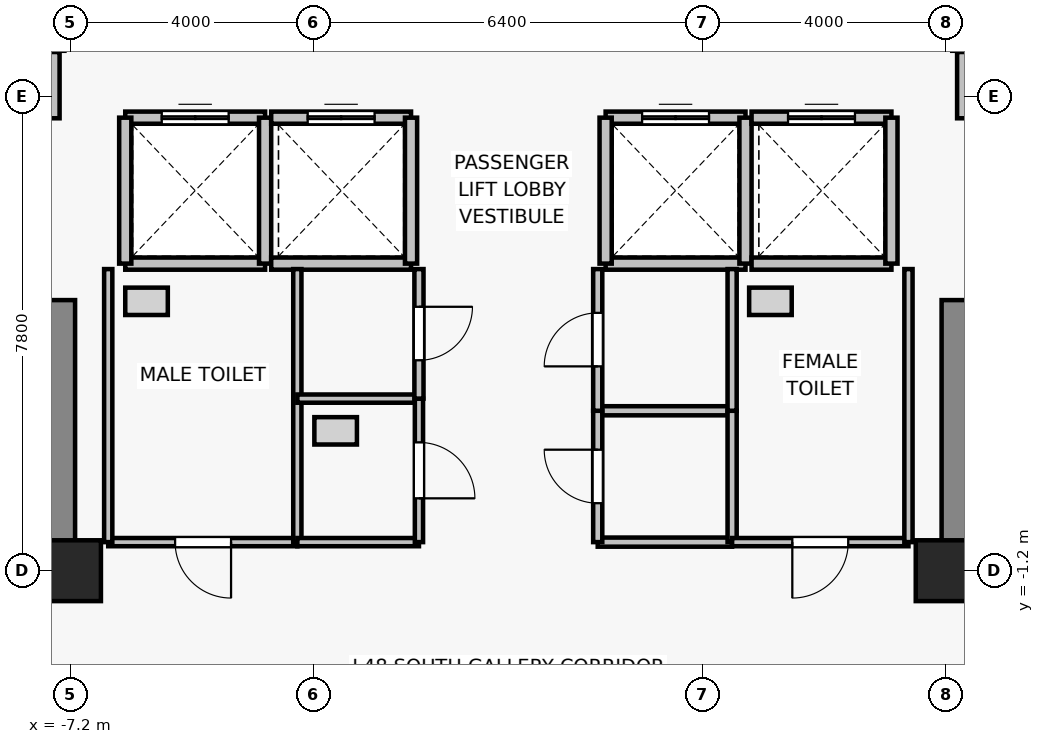
"""IFC4 building model, lengths in metres.
Left out: names, types, materials, properties, quantities, classifications, styles, units other than length and angle.
Written with IfcOpenShell. Run it as: python <this file> out.ifc"""

import sys

from ifc_helpers import new_model, si_unit, direction, frame, frame_2d, origin, origin_2d, place, context, subcontext, project, spatial, rectangle, extrude, source, transform, mapped, element, fill, save


model = new_model("IFC4")
c1 = context("Model", 3, precision=1e-05, world=origin(), true_north=direction((0.0, 1.0)))
c2 = subcontext(c1, "Body", "Model", "MODEL_VIEW")
j1 = project(units=[si_unit("LENGTHUNIT", "METRE"), si_unit("PLANEANGLEUNIT", "RADIAN")], contexts=[c1])
p1 = place(None, origin())
s1 = spatial("IfcSite", under=j1, at=p1, CompositionType="ELEMENT")
p2 = place(p1, origin())
s2 = spatial("IfcBuilding", under=s1, at=p2, CompositionType="ELEMENT")
p3 = place(p2, frame((0.0, 0.0, 172.6)))
s3 = spatial("IfcBuildingStorey", under=s2, at=p3, CompositionType="ELEMENT", Elevation=172.6)
for number, where, z_axis, x_axis in (
    (1, (-7.2, -1.2, 0.0), (0.0, 0.0, 1.0), (1.0, 0.0, 0.0)),
    (2, (7.2, -1.2, 0.0), (0.0, 0.0, 1.0), (1.0, 0.0, 0.0)),
):
    element("IfcColumn", number, at=place(p3, frame(where, z_axis=z_axis, x_axis=x_axis)), inside=s3, PredefinedType="COLUMN", context=c2, shape_type="SweptSolid", body=[
        extrude(rectangle(XDim=1.0, YDim=1.0, at=origin_2d()), origin(), (0.0, 0.0, 1.0), 3.3),
    ])
for number, where, z_axis, x_axis in (
    (3, (-7.4, -0.825, 0.0), (0.0, 0.0, 1.0), (0.0, 1.0, 0.0)),
    (4, (7.4, -0.825, 0.0), (0.0, 0.0, 1.0), (0.0, 1.0, 0.0)),
):
    element("IfcWall", number, at=place(p3, frame(where, z_axis=z_axis, x_axis=x_axis)), inside=s3, PredefinedType="SHEAR", context=c2, shape_type="SweptSolid", body=[
        extrude(rectangle(XDim=4.075, YDim=0.55, at=frame_2d((2.038, 0.0))), origin(), (0.0, 0.0, 1.0), 3.075),
    ])
p4 = place(p3, frame((-4.0, 3.85, 0.0), z_axis=(0.0, 0.0, 1.0), x_axis=(-1.0, 0.0, 0.0)))
e5 = element("IfcWall", 5, at=p4, inside=s3, PredefinedType="SOLIDWALL", context=c2, shape_type="SweptSolid", body=[
    extrude(rectangle(XDim=2.3, YDim=0.2, at=frame_2d((1.15, 0.0))), origin(), (0.0, 0.0, 1.0), 3.075),
])
p5 = place(p3, frame((-6.3, 6.25, 0.0), z_axis=(0.0, 0.0, 1.0), x_axis=(1.0, 0.0, 0.0)))
e6 = element("IfcWall", 6, at=p5, inside=s3, PredefinedType="SOLIDWALL", context=c2, shape_type="SweptSolid", body=[
    extrude(rectangle(XDim=2.3, YDim=0.2, at=frame_2d((1.15, 0.0))), origin(), (0.0, 0.0, 1.0), 3.075),
])
p6 = place(p5, frame((0.6, 0.0, 0.0)))
e7 = element("IfcOpeningElement", 7, at=p6, cuts=e6, PredefinedType="OPENING", context=c2, shape_type="SweptSolid", body=[
    extrude(rectangle(XDim=1.1, YDim=2.2, at=frame_2d((0.55, 1.1))), frame((0.0, 0.11, 0.0), z_axis=(0.0, -1.0, 0.0), x_axis=(1.0, 0.0, 0.0)), (0.0, 0.0, 1.0), 0.22),
])
for number, where, z_axis, x_axis in (
    (8, (-6.3, 3.85, 0.0), (0.0, 0.0, 1.0), (0.0, 1.0, 0.0)),
    (9, (-4.0, 6.25, 0.0), (0.0, 0.0, 1.0), (0.0, -1.0, 0.0)),
):
    element("IfcWall", number, at=place(p3, frame(where, z_axis=z_axis, x_axis=x_axis)), inside=s3, PredefinedType="SOLIDWALL", context=c2, shape_type="SweptSolid", body=[
        extrude(rectangle(XDim=2.4, YDim=0.2, at=frame_2d((1.2, 0.0))), origin(), (0.0, 0.0, 1.0), 3.075),
    ])
p7 = place(p3, frame((-1.6, 3.85, 0.0), z_axis=(0.0, 0.0, 1.0), x_axis=(-1.0, 0.0, 0.0)))
e10 = element("IfcWall", 10, at=p7, inside=s3, PredefinedType="SOLIDWALL", context=c2, shape_type="SweptSolid", body=[
    extrude(rectangle(XDim=2.3, YDim=0.2, at=frame_2d((1.15, 0.0))), origin(), (0.0, 0.0, 1.0), 3.075),
])
p8 = place(p3, frame((-3.9, 6.25, 0.0), z_axis=(0.0, 0.0, 1.0), x_axis=(1.0, 0.0, 0.0)))
e11 = element("IfcWall", 11, at=p8, inside=s3, PredefinedType="SOLIDWALL", context=c2, shape_type="SweptSolid", body=[
    extrude(rectangle(XDim=2.3, YDim=0.2, at=frame_2d((1.15, 0.0))), origin(), (0.0, 0.0, 1.0), 3.075),
])
p9 = place(p8, frame((0.6, 0.0, 0.0)))
e12 = element("IfcOpeningElement", 12, at=p9, cuts=e11, PredefinedType="OPENING", context=c2, shape_type="SweptSolid", body=[
    extrude(rectangle(XDim=1.1, YDim=2.2, at=frame_2d((0.55, 1.1))), frame((0.0, 0.11, 0.0), z_axis=(0.0, -1.0, 0.0), x_axis=(1.0, 0.0, 0.0)), (0.0, 0.0, 1.0), 0.22),
])
p10 = place(p3, frame((-1.6, 6.25, 0.0), z_axis=(0.0, 0.0, 1.0), x_axis=(0.0, -1.0, 0.0)))
e13 = element("IfcWall", 13, at=p10, inside=s3, PredefinedType="SOLIDWALL", context=c2, shape_type="SweptSolid", body=[
    extrude(rectangle(XDim=2.4, YDim=0.2, at=frame_2d((1.2, 0.0))), origin(), (0.0, 0.0, 1.0), 3.075),
])
p11 = place(p3, frame((3.9, 3.85, 0.0), z_axis=(0.0, 0.0, 1.0), x_axis=(-1.0, 0.0, 0.0)))
e14 = element("IfcWall", 14, at=p11, inside=s3, PredefinedType="SOLIDWALL", context=c2, shape_type="SweptSolid", body=[
    extrude(rectangle(XDim=2.3, YDim=0.2, at=frame_2d((1.15, 0.0))), origin(), (0.0, 0.0, 1.0), 3.075),
])
p12 = place(p3, frame((1.6, 6.25, 0.0), z_axis=(0.0, 0.0, 1.0), x_axis=(1.0, 0.0, 0.0)))
e15 = element("IfcWall", 15, at=p12, inside=s3, PredefinedType="SOLIDWALL", context=c2, shape_type="SweptSolid", body=[
    extrude(rectangle(XDim=2.3, YDim=0.2, at=frame_2d((1.15, 0.0))), origin(), (0.0, 0.0, 1.0), 3.075),
])
p13 = place(p12, frame((0.6, 0.0, 0.0)))
e16 = element("IfcOpeningElement", 16, at=p13, cuts=e15, PredefinedType="OPENING", context=c2, shape_type="SweptSolid", body=[
    extrude(rectangle(XDim=1.1, YDim=2.2, at=frame_2d((0.55, 1.1))), frame((0.0, 0.11, 0.0), z_axis=(0.0, -1.0, 0.0), x_axis=(1.0, 0.0, 0.0)), (0.0, 0.0, 1.0), 0.22),
])
for number, where, z_axis, x_axis in (
    (17, (1.6, 3.85, 0.0), (0.0, 0.0, 1.0), (0.0, 1.0, 0.0)),
    (18, (3.9, 6.25, 0.0), (0.0, 0.0, 1.0), (0.0, -1.0, 0.0)),
):
    element("IfcWall", number, at=place(p3, frame(where, z_axis=z_axis, x_axis=x_axis)), inside=s3, PredefinedType="SOLIDWALL", context=c2, shape_type="SweptSolid", body=[
        extrude(rectangle(XDim=2.4, YDim=0.2, at=frame_2d((1.2, 0.0))), origin(), (0.0, 0.0, 1.0), 3.075),
    ])
p14 = place(p3, frame((6.3, 3.85, 0.0), z_axis=(0.0, 0.0, 1.0), x_axis=(-1.0, 0.0, 0.0)))
e19 = element("IfcWall", 19, at=p14, inside=s3, PredefinedType="SOLIDWALL", context=c2, shape_type="SweptSolid", body=[
    extrude(rectangle(XDim=2.3, YDim=0.2, at=frame_2d((1.15, 0.0))), origin(), (0.0, 0.0, 1.0), 3.075),
])
p15 = place(p3, frame((4.0, 6.25, 0.0), z_axis=(0.0, 0.0, 1.0), x_axis=(1.0, 0.0, 0.0)))
e20 = element("IfcWall", 20, at=p15, inside=s3, PredefinedType="SOLIDWALL", context=c2, shape_type="SweptSolid", body=[
    extrude(rectangle(XDim=2.3, YDim=0.2, at=frame_2d((1.15, 0.0))), origin(), (0.0, 0.0, 1.0), 3.075),
])
p16 = place(p15, frame((0.6, 0.0, 0.0)))
e21 = element("IfcOpeningElement", 21, at=p16, cuts=e20, PredefinedType="OPENING", context=c2, shape_type="SweptSolid", body=[
    extrude(rectangle(XDim=1.1, YDim=2.2, at=frame_2d((0.55, 1.1))), frame((0.0, 0.11, 0.0), z_axis=(0.0, -1.0, 0.0), x_axis=(1.0, 0.0, 0.0)), (0.0, 0.0, 1.0), 0.22),
])
p17 = place(p3, frame((6.3, 6.25, 0.0), z_axis=(0.0, 0.0, 1.0), x_axis=(0.0, -1.0, 0.0)))
e22 = element("IfcWall", 22, at=p17, inside=s3, PredefinedType="SOLIDWALL", context=c2, shape_type="SweptSolid", body=[
    extrude(rectangle(XDim=2.4, YDim=0.2, at=frame_2d((1.2, 0.0))), origin(), (0.0, 0.0, 1.0), 3.075),
])
for number, where, z_axis, x_axis in (
    (23, (-7.4, 7.35, 0.0), (0.0, 0.0, 1.0), (-1.0, 0.0, 0.0)),
    (24, (9.6, 7.35, 0.0), (0.0, 0.0, 1.0), (-1.0, 0.0, 0.0)),
):
    element("IfcWall", number, at=place(p3, frame(where, z_axis=z_axis, x_axis=x_axis)), inside=s3, PredefinedType="SOLIDWALL", context=c2, shape_type="SweptSolid", body=[
        extrude(rectangle(XDim=2.2, YDim=0.2, at=frame_2d((1.1, 0.0))), origin(), (0.0, 0.0, 1.0), 2.565),
    ])
for number, where, z_axis, x_axis in (
    (25, (-7.47, 7.33, 0.0), (0.0, 0.0, 1.0), (0.0, -1.0, 0.0)),
    (26, (7.47, 6.24, 0.0), (0.0, 0.0, 1.0), (0.0, 1.0, 0.0)),
):
    element("IfcWall", number, at=place(p3, frame(where, z_axis=z_axis, x_axis=x_axis)), inside=s3, PredefinedType="PARTITIONING", context=c2, shape_type="SweptSolid", body=[
        extrude(rectangle(XDim=1.09, YDim=0.18, at=frame_2d((0.545, 0.0))), origin(), (0.0, 0.0, 1.0), 2.565),
    ])
p18 = place(p3, frame((-3.47, -0.73, 0.0), z_axis=(0.0, 0.0, 1.0), x_axis=(-1.0, 0.0, 0.0)))
e27 = element("IfcWall", 27, at=p18, inside=s3, PredefinedType="PARTITIONING", context=c2, shape_type="SweptSolid", body=[
    extrude(rectangle(XDim=3.11, YDim=0.135, at=frame_2d((1.555, 0.0))), origin(), (0.0, 0.0, 1.0), 3.075),
])
p19 = place(p18, frame((1.09, 0.0, 0.0)))
e28 = element("IfcOpeningElement", 28, at=p19, cuts=e27, PredefinedType="OPENING", context=c2, shape_type="SweptSolid", body=[
    extrude(rectangle(XDim=0.92, YDim=2.1, at=frame_2d((0.46, 1.05))), frame((0.0, 0.077, 0.0), z_axis=(0.0, -1.0, 0.0), x_axis=(1.0, 0.0, 0.0)), (0.0, 0.0, 1.0), 0.155),
])
for number, where, z_axis, x_axis in (
    (29, (-6.58, -0.73, 0.0), (0.0, 0.0, 1.0), (0.0, 1.0, 0.0)),
    (30, (-3.47, 3.76, 0.0), (0.0, 0.0, 1.0), (0.0, -1.0, 0.0)),
):
    element("IfcWall", number, at=place(p3, frame(where, z_axis=z_axis, x_axis=x_axis)), inside=s3, PredefinedType="PARTITIONING", context=c2, shape_type="SweptSolid", body=[
        extrude(rectangle(XDim=4.49, YDim=0.135, at=frame_2d((2.245, 0.0))), origin(), (0.0, 0.0, 1.0), 3.075),
    ])
for number, where, z_axis, x_axis in (
    (31, (-1.47, -0.73, 0.0), (0.0, 0.0, 1.0), (-1.0, 0.0, 0.0)),
    (32, (-3.47, 1.63, 0.0), (0.0, 0.0, 1.0), (1.0, 0.0, 0.0)),
):
    element("IfcWall", number, at=place(p3, frame(where, z_axis=z_axis, x_axis=x_axis)), inside=s3, PredefinedType="PARTITIONING", context=c2, shape_type="SweptSolid", body=[
        extrude(rectangle(XDim=2.0, YDim=0.135, at=frame_2d((1.0, 0.0))), origin(), (0.0, 0.0, 1.0), 3.075),
    ])
p20 = place(p3, frame((-1.47, 1.63, 0.0), z_axis=(0.0, 0.0, 1.0), x_axis=(0.0, -1.0, 0.0)))
e33 = element("IfcWall", 33, at=p20, inside=s3, PredefinedType="PARTITIONING", context=c2, shape_type="SweptSolid", body=[
    extrude(rectangle(XDim=2.36, YDim=0.135, at=frame_2d((1.18, 0.0))), origin(), (0.0, 0.0, 1.0), 3.075),
])
p21 = place(p20, frame((0.72, 0.0, 0.0)))
e34 = element("IfcOpeningElement", 34, at=p21, cuts=e33, PredefinedType="OPENING", context=c2, shape_type="SweptSolid", body=[
    extrude(rectangle(XDim=0.92, YDim=2.1, at=frame_2d((0.46, 1.05))), frame((0.0, 0.077, 0.0), z_axis=(0.0, -1.0, 0.0), x_axis=(1.0, 0.0, 0.0)), (0.0, 0.0, 1.0), 0.155),
])
p22 = place(p3, frame((-1.47, 3.76, 0.0), z_axis=(0.0, 0.0, 1.0), x_axis=(0.0, -1.0, 0.0)))
e35 = element("IfcWall", 35, at=p22, inside=s3, PredefinedType="PARTITIONING", context=c2, shape_type="SweptSolid", body=[
    extrude(rectangle(XDim=2.13, YDim=0.15, at=frame_2d((1.065, 0.0))), origin(), (0.0, 0.0, 1.0), 3.075),
])
p23 = place(p22, frame((0.62, 0.0, 0.0)))
e36 = element("IfcOpeningElement", 36, at=p23, cuts=e35, PredefinedType="OPENING", context=c2, shape_type="SweptSolid", body=[
    extrude(rectangle(XDim=0.88, YDim=2.1, at=frame_2d((0.44, 1.05))), frame((0.0, 0.085, 0.0), z_axis=(0.0, -1.0, 0.0), x_axis=(1.0, 0.0, 0.0)), (0.0, 0.0, 1.0), 0.17),
])
for number, where, z_axis, x_axis in (
    (37, (3.68, -0.73, 0.0), (0.0, 0.0, 1.0), (-1.0, 0.0, 0.0)),
    (38, (1.47, 1.43, 0.0), (0.0, 0.0, 1.0), (1.0, 0.0, 0.0)),
):
    element("IfcWall", number, at=place(p3, frame(where, z_axis=z_axis, x_axis=x_axis)), inside=s3, PredefinedType="PARTITIONING", context=c2, shape_type="SweptSolid", body=[
        extrude(rectangle(XDim=2.21, YDim=0.15, at=frame_2d((1.105, 0.0))), origin(), (0.0, 0.0, 1.0), 3.075),
    ])
p24 = place(p3, frame((1.47, -0.73, 0.0), z_axis=(0.0, 0.0, 1.0), x_axis=(0.0, 1.0, 0.0)))
e39 = element("IfcWall", 39, at=p24, inside=s3, PredefinedType="PARTITIONING", context=c2, shape_type="SweptSolid", body=[
    extrude(rectangle(XDim=2.16, YDim=0.15, at=frame_2d((1.08, 0.0))), origin(), (0.0, 0.0, 1.0), 3.075),
])
p25 = place(p24, frame((0.64, 0.0, 0.0)))
e40 = element("IfcOpeningElement", 40, at=p25, cuts=e39, PredefinedType="OPENING", context=c2, shape_type="SweptSolid", body=[
    extrude(rectangle(XDim=0.88, YDim=2.1, at=frame_2d((0.44, 1.05))), frame((0.0, 0.085, 0.0), z_axis=(0.0, -1.0, 0.0), x_axis=(1.0, 0.0, 0.0)), (0.0, 0.0, 1.0), 0.17),
])
p26 = place(p3, frame((3.68, 1.43, 0.0), z_axis=(0.0, 0.0, 1.0), x_axis=(0.0, -1.0, 0.0)))
e41 = element("IfcWall", 41, at=p26, inside=s3, PredefinedType="PARTITIONING", context=c2, shape_type="SweptSolid", body=[
    extrude(rectangle(XDim=2.16, YDim=0.15, at=frame_2d((1.08, 0.0))), origin(), (0.0, 0.0, 1.0), 3.075),
])
p27 = place(p3, frame((1.47, 1.43, 0.0), z_axis=(0.0, 0.0, 1.0), x_axis=(0.0, 1.0, 0.0)))
e42 = element("IfcWall", 42, at=p27, inside=s3, PredefinedType="PARTITIONING", context=c2, shape_type="SweptSolid", body=[
    extrude(rectangle(XDim=2.33, YDim=0.15, at=frame_2d((1.165, 0.0))), origin(), (0.0, 0.0, 1.0), 3.075),
])
p28 = place(p27, frame((0.73, 0.0, 0.0)))
e43 = element("IfcOpeningElement", 43, at=p28, cuts=e42, PredefinedType="OPENING", context=c2, shape_type="SweptSolid", body=[
    extrude(rectangle(XDim=0.88, YDim=2.15, at=frame_2d((0.44, 1.075))), frame((0.0, 0.085, 0.0), z_axis=(0.0, -1.0, 0.0), x_axis=(1.0, 0.0, 0.0)), (0.0, 0.0, 1.0), 0.17),
])
p29 = place(p3, frame((3.68, 3.76, 0.0), z_axis=(0.0, 0.0, 1.0), x_axis=(0.0, -1.0, 0.0)))
e44 = element("IfcWall", 44, at=p29, inside=s3, PredefinedType="PARTITIONING", context=c2, shape_type="SweptSolid", body=[
    extrude(rectangle(XDim=2.33, YDim=0.15, at=frame_2d((1.165, 0.0))), origin(), (0.0, 0.0, 1.0), 3.075),
])
p30 = place(p3, frame((6.58, -0.73, 0.0), z_axis=(0.0, 0.0, 1.0), x_axis=(-1.0, 0.0, 0.0)))
e45 = element("IfcWall", 45, at=p30, inside=s3, PredefinedType="PARTITIONING", context=c2, shape_type="SweptSolid", body=[
    extrude(rectangle(XDim=2.9, YDim=0.135, at=frame_2d((1.45, 0.0))), origin(), (0.0, 0.0, 1.0), 3.075),
])
p31 = place(p30, frame((0.99, 0.0, 0.0)))
e46 = element("IfcOpeningElement", 46, at=p31, cuts=e45, PredefinedType="OPENING", context=c2, shape_type="SweptSolid", body=[
    extrude(rectangle(XDim=0.92, YDim=2.1, at=frame_2d((0.46, 1.05))), frame((0.0, 0.077, 0.0), z_axis=(0.0, -1.0, 0.0), x_axis=(1.0, 0.0, 0.0)), (0.0, 0.0, 1.0), 0.155),
])
p32 = place(p3, frame((6.58, 3.76, 0.0), z_axis=(0.0, 0.0, 1.0), x_axis=(0.0, -1.0, 0.0)))
e47 = element("IfcWall", 47, at=p32, inside=s3, PredefinedType="PARTITIONING", context=c2, shape_type="SweptSolid", body=[
    extrude(rectangle(XDim=4.49, YDim=0.135, at=frame_2d((2.245, 0.0))), origin(), (0.0, 0.0, 1.0), 3.075),
])
m1 = source(origin(), c2, "Body", "SweptSolid", [
    extrude(rectangle(XDim=1.1, YDim=2.2, at=frame_2d((0.55, 1.1))), frame((0.0, 0.025, 0.0), z_axis=(0.0, -1.0, 0.0), x_axis=(1.0, 0.0, 0.0)), (0.0, 0.0, 1.0), 0.05),
])
p33 = place(p6, origin())
e48 = element("IfcDoor", 48, at=p33, inside=s3, OperationType="DOUBLE_DOOR_SLIDING", PredefinedType="DOOR", context=c2, shape_type="MappedRepresentation", body=[
    mapped(m1, transform((0.0, 0.0, 0.0), x_axis=(1.0, 0.0, 0.0), y_axis=(0.0, 1.0, 0.0), z_axis=(0.0, 0.0, 1.0), scale=1.0)),
])
fill(e7, e48)
p34 = place(p9, origin())
e49 = element("IfcDoor", 49, at=p34, inside=s3, OperationType="DOUBLE_DOOR_SLIDING", PredefinedType="DOOR", context=c2, shape_type="MappedRepresentation", body=[
    mapped(m1, transform((0.0, 0.0, 0.0), x_axis=(1.0, 0.0, 0.0), y_axis=(0.0, 1.0, 0.0), z_axis=(0.0, 0.0, 1.0), scale=1.0)),
])
fill(e12, e49)
p35 = place(p13, origin())
e50 = element("IfcDoor", 50, at=p35, inside=s3, OperationType="DOUBLE_DOOR_SLIDING", PredefinedType="DOOR", context=c2, shape_type="MappedRepresentation", body=[
    mapped(m1, transform((0.0, 0.0, 0.0), x_axis=(1.0, 0.0, 0.0), y_axis=(0.0, 1.0, 0.0), z_axis=(0.0, 0.0, 1.0), scale=1.0)),
])
fill(e16, e50)
p36 = place(p16, origin())
e51 = element("IfcDoor", 51, at=p36, inside=s3, OperationType="DOUBLE_DOOR_SLIDING", PredefinedType="DOOR", context=c2, shape_type="MappedRepresentation", body=[
    mapped(m1, transform((0.0, 0.0, 0.0), x_axis=(1.0, 0.0, 0.0), y_axis=(0.0, 1.0, 0.0), z_axis=(0.0, 0.0, 1.0), scale=1.0)),
])
fill(e21, e51)
m2 = source(origin(), c2, "Body", "SweptSolid", [
    extrude(rectangle(XDim=0.92, YDim=2.1, at=frame_2d((0.46, 1.05))), frame((0.0, 0.025, 0.0), z_axis=(0.0, -1.0, 0.0), x_axis=(1.0, 0.0, 0.0)), (0.0, 0.0, 1.0), 0.05),
])
p37 = place(p19, origin())
e52 = element("IfcDoor", 52, at=p37, inside=s3, OperationType="SINGLE_SWING_LEFT", PredefinedType="DOOR", context=c2, shape_type="MappedRepresentation", body=[
    mapped(m2, transform((0.0, 0.0, 0.0), x_axis=(1.0, 0.0, 0.0), y_axis=(0.0, 1.0, 0.0), z_axis=(0.0, 0.0, 1.0), scale=1.0)),
])
fill(e28, e52)
p38 = place(p21, origin())
e53 = element("IfcDoor", 53, at=p38, inside=s3, OperationType="SINGLE_SWING_RIGHT", PredefinedType="DOOR", context=c2, shape_type="MappedRepresentation", body=[
    mapped(m2, transform((0.0, 0.0, 0.0), x_axis=(1.0, 0.0, 0.0), y_axis=(0.0, 1.0, 0.0), z_axis=(0.0, 0.0, 1.0), scale=1.0)),
])
fill(e34, e53)
m3 = source(origin(), c2, "Body", "SweptSolid", [
    extrude(rectangle(XDim=0.88, YDim=2.1, at=frame_2d((0.44, 1.05))), frame((0.0, 0.025, 0.0), z_axis=(0.0, -1.0, 0.0), x_axis=(1.0, 0.0, 0.0)), (0.0, 0.0, 1.0), 0.05),
])
p39 = place(p23, origin())
e54 = element("IfcDoor", 54, at=p39, inside=s3, OperationType="SINGLE_SWING_LEFT", PredefinedType="DOOR", context=c2, shape_type="MappedRepresentation", body=[
    mapped(m3, transform((0.0, 0.0, 0.0), x_axis=(1.0, 0.0, 0.0), y_axis=(0.0, 1.0, 0.0), z_axis=(0.0, 0.0, 1.0), scale=1.0)),
])
fill(e36, e54)
p40 = place(p25, origin())
e55 = element("IfcDoor", 55, at=p40, inside=s3, OperationType="SINGLE_SWING_RIGHT", PredefinedType="DOOR", context=c2, shape_type="MappedRepresentation", body=[
    mapped(m3, transform((0.0, 0.0, 0.0), x_axis=(1.0, 0.0, 0.0), y_axis=(0.0, 1.0, 0.0), z_axis=(0.0, 0.0, 1.0), scale=1.0)),
])
fill(e40, e55)
m4 = source(origin(), c2, "Body", "SweptSolid", [
    extrude(rectangle(XDim=0.88, YDim=2.15, at=frame_2d((0.44, 1.075))), frame((0.0, 0.025, 0.0), z_axis=(0.0, -1.0, 0.0), x_axis=(1.0, 0.0, 0.0)), (0.0, 0.0, 1.0), 0.05),
])
p41 = place(p28, origin())
e56 = element("IfcDoor", 56, at=p41, inside=s3, OperationType="SINGLE_SWING_LEFT", PredefinedType="DOOR", context=c2, shape_type="MappedRepresentation", body=[
    mapped(m4, transform((0.0, 0.0, 0.0), x_axis=(1.0, 0.0, 0.0), y_axis=(0.0, 1.0, 0.0), z_axis=(0.0, 0.0, 1.0), scale=1.0)),
])
fill(e43, e56)
p42 = place(p31, origin())
e57 = element("IfcDoor", 57, at=p42, inside=s3, OperationType="SINGLE_SWING_RIGHT", PredefinedType="DOOR", context=c2, shape_type="MappedRepresentation", body=[
    mapped(m2, transform((0.0, 0.0, 0.0), x_axis=(1.0, 0.0, 0.0), y_axis=(0.0, 1.0, 0.0), z_axis=(0.0, 0.0, 1.0), scale=1.0)),
])
fill(e46, e57)
save(model, sys.argv[1])
